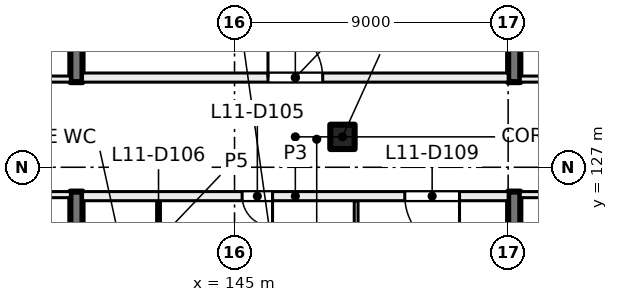
"""IFC4 building model, lengths in metres.
Left out: names, types, materials, properties, quantities, classifications, styles, units other than length and angle.
Written with IfcOpenShell. Run it as: python <this file> out.ifc"""

import sys

from ifc_helpers import new_model, si_unit, direction, frame, frame_2d, origin, origin_2d, place, context, subcontext, project, spatial, rectangle, extrude, element, fill, save


model = new_model("IFC4")
c1 = context("Model", 3, precision=1e-05, world=origin(), true_north=direction((0.0, 1.0)))
c2 = subcontext(c1, "Body", "Model", "MODEL_VIEW")
j1 = project(units=[si_unit("LENGTHUNIT", "METRE"), si_unit("PLANEANGLEUNIT", "RADIAN")], contexts=[c1])
p1 = place(None, origin())
s1 = spatial("IfcSite", under=j1, at=p1, CompositionType="ELEMENT")
p2 = place(p1, origin())
s2 = spatial("IfcBuilding", under=s1, at=p2, CompositionType="ELEMENT")
p3 = place(p2, frame((0.0, 0.0, 51.5)))
s3 = spatial("IfcBuildingStorey", under=s2, at=p3, CompositionType="ELEMENT", Elevation=51.5)
p4 = place(p3, frame((148.55, 128.0, 0.0), z_axis=(0.0, 0.0, 1.0), x_axis=(1.0, 0.0, 0.0)))
e1 = element("IfcColumn", 1, at=p4, inside=s3, PredefinedType="COLUMN", context=c2, shape_type="SweptSolid", body=[
    extrude(rectangle(XDim=0.8, YDim=0.8, at=origin_2d()), origin(), (0.0, 0.0, 1.0), 4.0),
])
for number, where, z_axis, x_axis in (
    (2, (139.8, 117.6, 0.0), (0.0, 0.0, 1.0), (0.0, 1.0, 0.0)),
    (3, (139.8, 129.8, 0.0), (0.0, 0.0, 1.0), (0.0, 1.0, 0.0)),
    (4, (154.2, 138.4, 0.0), (0.0, 0.0, 1.0), (0.0, -1.0, 0.0)),
    (5, (154.2, 126.2, 0.0), (0.0, 0.0, 1.0), (0.0, -1.0, 0.0)),
):
    element("IfcWall", number, at=place(p3, frame(where, z_axis=z_axis, x_axis=x_axis)), inside=s3, PredefinedType="SHEAR", context=c2, shape_type="SweptSolid", body=[
        extrude(rectangle(XDim=8.6, YDim=0.4, at=frame_2d((4.3, 0.0))), origin(), (0.0, 0.0, 1.0), 4.0),
    ])
p5 = place(p3, frame((135.0, 129.9, 0.0), z_axis=(0.0, 0.0, 1.0), x_axis=(1.0, 0.0, 0.0)))
e6 = element("IfcWall", 6, at=p5, inside=s3, PredefinedType="PARTITIONING", context=c2, shape_type="SweptSolid", body=[
    extrude(rectangle(XDim=4.6, YDim=0.2, at=frame_2d((2.3, 0.0))), origin(), (0.0, 0.0, 1.0), 3.625),
])
p6 = place(p5, frame((1.7, 0.0, 0.0)))
e7 = element("IfcOpeningElement", 7, at=p6, cuts=e6, PredefinedType="OPENING", context=c2, shape_type="SweptSolid", body=[
    extrude(rectangle(XDim=1.2, YDim=2.1, at=frame_2d((0.6, 1.05))), frame((0.0, 0.11, 0.0), z_axis=(0.0, -1.0, 0.0), x_axis=(1.0, 0.0, 0.0)), (0.0, 0.0, 1.0), 0.22),
])
p7 = place(p3, frame((139.6, 126.1, 0.0), z_axis=(0.0, 0.0, 1.0), x_axis=(-1.0, 0.0, 0.0)))
e8 = element("IfcWall", 8, at=p7, inside=s3, PredefinedType="PARTITIONING", context=c2, shape_type="SweptSolid", body=[
    extrude(rectangle(XDim=4.6, YDim=0.2, at=frame_2d((2.3, 0.0))), origin(), (0.0, 0.0, 1.0), 3.625),
])
p8 = place(p7, frame((1.7, 0.0, 0.0)))
e9 = element("IfcOpeningElement", 9, at=p8, cuts=e8, PredefinedType="OPENING", context=c2, shape_type="SweptSolid", body=[
    extrude(rectangle(XDim=1.2, YDim=2.1, at=frame_2d((0.6, 1.05))), frame((0.0, 0.11, 0.0), z_axis=(0.0, -1.0, 0.0), x_axis=(1.0, 0.0, 0.0)), (0.0, 0.0, 1.0), 0.22),
])
p9 = place(p3, frame((163.8, 126.1, 0.0), z_axis=(0.0, 0.0, 1.0), x_axis=(-1.0, 0.0, 0.0)))
e10 = element("IfcWall", 10, at=p9, inside=s3, PredefinedType="PARTITIONING", context=c2, shape_type="SweptSolid", body=[
    extrude(rectangle(XDim=9.4, YDim=0.2, at=frame_2d((4.7, 0.0))), origin(), (0.0, 0.0, 1.0), 3.625),
])
p10 = place(p9, frame((4.1, 0.0, 0.0)))
e11 = element("IfcOpeningElement", 11, at=p10, cuts=e10, PredefinedType="OPENING", context=c2, shape_type="SweptSolid", body=[
    extrude(rectangle(XDim=1.2, YDim=2.1, at=frame_2d((0.6, 1.05))), frame((0.0, 0.11, 0.0), z_axis=(0.0, -1.0, 0.0), x_axis=(1.0, 0.0, 0.0)), (0.0, 0.0, 1.0), 0.22),
])
p11 = place(p3, frame((154.4, 129.9, 0.0), z_axis=(0.0, 0.0, 1.0), x_axis=(1.0, 0.0, 0.0)))
e12 = element("IfcWall", 12, at=p11, inside=s3, PredefinedType="PARTITIONING", context=c2, shape_type="SweptSolid", body=[
    extrude(rectangle(XDim=9.4, YDim=0.2, at=frame_2d((4.7, 0.0))), origin(), (0.0, 0.0, 1.0), 3.625),
])
p12 = place(p11, frame((4.1, 0.0, 0.0)))
e13 = element("IfcOpeningElement", 13, at=p12, cuts=e12, PredefinedType="OPENING", context=c2, shape_type="SweptSolid", body=[
    extrude(rectangle(XDim=1.2, YDim=2.1, at=frame_2d((0.6, 1.05))), frame((0.0, 0.11, 0.0), z_axis=(0.0, -1.0, 0.0), x_axis=(1.0, 0.0, 0.0)), (0.0, 0.0, 1.0), 0.22),
])
p13 = place(p3, frame((140.0, 129.95, 0.0), z_axis=(0.0, 0.0, 1.0), x_axis=(1.0, 0.0, 0.0)))
e14 = element("IfcWall", 14, at=p13, inside=s3, PredefinedType="PARTITIONING", context=c2, shape_type="SweptSolid", body=[
    extrude(rectangle(XDim=14.0, YDim=0.3, at=frame_2d((7.0, 0.0))), origin(), (0.0, 0.0, 1.0), 3.625),
])
p14 = place(p13, frame((6.1, 0.0, 0.0)))
e15 = element("IfcOpeningElement", 15, at=p14, cuts=e14, PredefinedType="OPENING", context=c2, shape_type="SweptSolid", body=[
    extrude(rectangle(XDim=1.8, YDim=2.1, at=frame_2d((0.9, 1.05))), frame((0.0, 0.16, 0.0), z_axis=(0.0, -1.0, 0.0), x_axis=(1.0, 0.0, 0.0)), (0.0, 0.0, 1.0), 0.32),
])
p15 = place(p3, frame((142.5, 123.312, 0.0), z_axis=(0.0, 0.0, 1.0), x_axis=(0.0, 1.0, 0.0)))
e16 = element("IfcWall", 16, at=p15, inside=s3, PredefinedType="PARTITIONING", context=c2, shape_type="SweptSolid", body=[
    extrude(rectangle(XDim=2.588, YDim=0.125, at=frame_2d((1.294, 0.0))), origin(), (0.0, 0.0, 1.0), 3.625),
])
p16 = place(p15, frame((0.794, 0.0, 0.0)))
e17 = element("IfcOpeningElement", 17, at=p16, cuts=e16, PredefinedType="OPENING", context=c2, shape_type="SweptSolid", body=[
    extrude(rectangle(XDim=1.0, YDim=2.1, at=frame_2d((0.5, 1.05))), frame((0.0, 0.073, 0.0), z_axis=(0.0, -1.0, 0.0), x_axis=(1.0, 0.0, 0.0)), (0.0, 0.0, 1.0), 0.145),
])
p17 = place(p3, frame((149.0, 116.988, 0.0), z_axis=(0.0, 0.0, 1.0), x_axis=(0.0, 1.0, 0.0)))
e18 = element("IfcWall", 18, at=p17, inside=s3, PredefinedType="PARTITIONING", context=c2, shape_type="SweptSolid", body=[
    extrude(rectangle(XDim=8.912, YDim=0.125, at=frame_2d((4.456, 0.0))), origin(), (0.0, 0.0, 1.0), 3.625),
])
p18 = place(p3, frame((154.0, 126.05, 0.0), z_axis=(0.0, 0.0, 1.0), x_axis=(-1.0, 0.0, 0.0)))
e19 = element("IfcWall", 19, at=p18, inside=s3, PredefinedType="PARTITIONING", context=c2, shape_type="SweptSolid", body=[
    extrude(rectangle(XDim=14.0, YDim=0.3, at=frame_2d((7.0, 0.0))), origin(), (0.0, 0.0, 1.0), 3.625),
])
p19 = place(p18, frame((7.75, 0.0, 0.0)))
e20 = element("IfcOpeningElement", 20, at=p19, cuts=e19, PredefinedType="OPENING", context=c2, shape_type="SweptSolid", body=[
    extrude(rectangle(XDim=1.0, YDim=2.1, at=frame_2d((0.5, 1.05))), frame((0.0, 0.16, 0.0), z_axis=(0.0, -1.0, 0.0), x_axis=(1.0, 0.0, 0.0)), (0.0, 0.0, 1.0), 0.32),
])
p20 = place(p18, frame((1.6, 0.0, 0.0)))
e21 = element("IfcOpeningElement", 21, at=p20, cuts=e19, PredefinedType="OPENING", context=c2, shape_type="SweptSolid", body=[
    extrude(rectangle(XDim=1.8, YDim=2.1, at=frame_2d((0.9, 1.05))), frame((0.0, 0.16, 0.0), z_axis=(0.0, -1.0, 0.0), x_axis=(1.0, 0.0, 0.0)), (0.0, 0.0, 1.0), 0.32),
])
p21 = place(p14, origin())
e22 = element("IfcDoor", 22, at=p21, inside=s3, OperationType="DOUBLE_DOOR_SINGLE_SWING", PredefinedType="DOOR", context=c2, shape_type="SweptSolid", body=[
    extrude(rectangle(XDim=1.8, YDim=2.1, at=frame_2d((0.9, 1.05))), frame((0.0, 0.025, 0.0), z_axis=(0.0, -1.0, 0.0), x_axis=(1.0, 0.0, 0.0)), (0.0, 0.0, 1.0), 0.05),
])
fill(e15, e22)
p22 = place(p19, origin())
e23 = element("IfcDoor", 23, at=p22, inside=s3, OperationType="SINGLE_SWING_RIGHT", PredefinedType="DOOR", context=c2, shape_type="SweptSolid", body=[
    extrude(rectangle(XDim=1.0, YDim=2.1, at=frame_2d((0.5, 1.05))), frame((0.0, 0.025, 0.0), z_axis=(0.0, -1.0, 0.0), x_axis=(1.0, 0.0, 0.0)), (0.0, 0.0, 1.0), 0.05),
])
fill(e20, e23)
p23 = place(p20, origin())
e24 = element("IfcDoor", 24, at=p23, inside=s3, OperationType="DOUBLE_DOOR_SINGLE_SWING", PredefinedType="DOOR", context=c2, shape_type="SweptSolid", body=[
    extrude(rectangle(XDim=1.8, YDim=2.1, at=frame_2d((0.9, 1.05))), frame((0.0, 0.025, 0.0), z_axis=(0.0, -1.0, 0.0), x_axis=(1.0, 0.0, 0.0)), (0.0, 0.0, 1.0), 0.05),
])
fill(e21, e24)
save(model, sys.argv[1])
